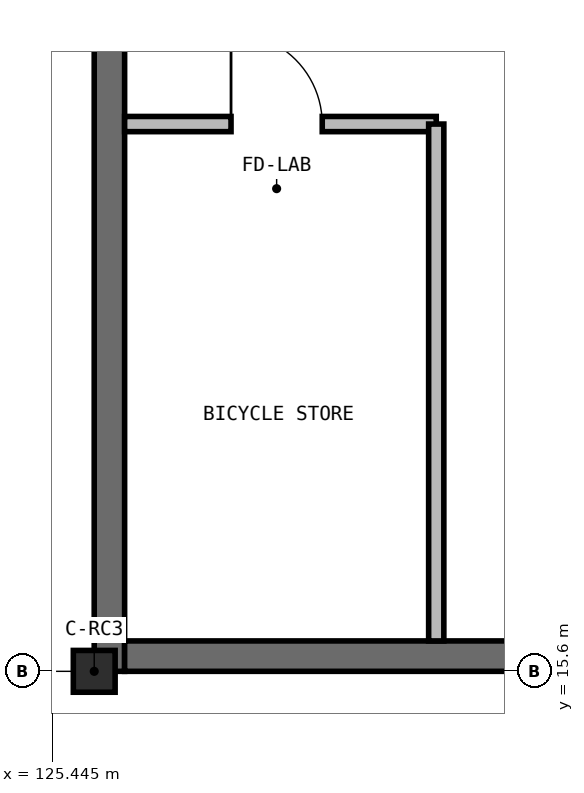
"""IFC4 building model, lengths in metres.
Left out: names, types, materials, properties, quantities, classifications, styles, units other than length and angle.
Written with IfcOpenShell. Run it as: python <this file> out.ifc"""

import sys

from ifc_helpers import new_model, si_unit, direction, frame, frame_2d, origin, origin_2d, place, context, subcontext, project, spatial, rectangle, extrude, element, fill, save


model = new_model("IFC4")
c1 = context("Model", 3, precision=1e-05, world=origin(), true_north=direction((0.0, 1.0)))
c2 = subcontext(c1, "Body", "Model", "MODEL_VIEW")
j1 = project(units=[si_unit("LENGTHUNIT", "METRE"), si_unit("PLANEANGLEUNIT", "RADIAN")], contexts=[c1])
p1 = place(None, origin())
s1 = spatial("IfcSite", under=j1, at=p1, CompositionType="ELEMENT")
p2 = place(p1, origin())
s2 = spatial("IfcBuilding", under=s1, at=p2, CompositionType="ELEMENT")
p3 = place(p2, frame((0.0, 0.0, -5.25)))
s3 = spatial("IfcBuildingStorey", under=s2, at=p3, CompositionType="ELEMENT", Elevation=-5.25)
p4 = place(p3, frame((126.2, 15.6, 0.0), z_axis=(0.0, 0.0, 1.0), x_axis=(0.0, 1.0, 0.0)))
e1 = element("IfcWall", 1, at=p4, inside=s3, PredefinedType="USERDEFINED", context=c2, shape_type="SweptSolid", body=[
    extrude(rectangle(XDim=55.2, YDim=0.4, at=frame_2d((27.6, 0.0))), origin(), (0.0, 0.0, 1.0), 5.25),
])
p5 = place(p3, frame((173.6, 15.8, 0.0), z_axis=(0.0, 0.0, 1.0), x_axis=(-1.0, 0.0, 0.0)))
e2 = element("IfcWall", 2, at=p5, inside=s3, PredefinedType="USERDEFINED", context=c2, shape_type="SweptSolid", body=[
    extrude(rectangle(XDim=47.2, YDim=0.4, at=frame_2d((23.6, 0.0))), origin(), (0.0, 0.0, 1.0), 5.25),
])
p6 = place(p3, frame((126.0, 15.6, 0.0), z_axis=(0.0, 0.0, 1.0), x_axis=(1.0, 0.0, 0.0)))
e3 = element("IfcColumn", 3, at=p6, inside=s3, PredefinedType="COLUMN", context=c2, shape_type="SweptSolid", body=[
    extrude(rectangle(XDim=0.55, YDim=0.55, at=origin_2d()), origin(), (0.0, 0.0, 1.0), 5.25),
])
p7 = place(p3, frame((126.4, 22.8, 0.0), z_axis=(0.0, 0.0, 1.0), x_axis=(1.0, 0.0, 0.0)))
e4 = element("IfcWall", 4, at=p7, inside=s3, PredefinedType="SOLIDWALL", context=c2, shape_type="SweptSolid", body=[
    extrude(rectangle(XDim=4.1, YDim=0.2, at=frame_2d((2.05, 0.0))), origin(), (0.0, 0.0, 1.0), 4.445),
])
p8 = place(p7, frame((1.4, 0.0, 0.0)))
e5 = element("IfcOpeningElement", 5, at=p8, cuts=e4, PredefinedType="OPENING", context=c2, shape_type="SweptSolid", body=[
    extrude(rectangle(XDim=1.2, YDim=2.2, at=frame_2d((0.6, 1.1))), frame((0.0, 0.11, 0.0), z_axis=(0.0, -1.0, 0.0), x_axis=(1.0, 0.0, 0.0)), (0.0, 0.0, 1.0), 0.22),
])
p9 = place(p3, frame((130.5, 16.0, 0.0), z_axis=(0.0, 0.0, 1.0), x_axis=(0.0, 1.0, 0.0)))
e6 = element("IfcWall", 6, at=p9, inside=s3, PredefinedType="SOLIDWALL", context=c2, shape_type="SweptSolid", body=[
    extrude(rectangle(XDim=6.8, YDim=0.2, at=frame_2d((3.4, 0.0))), origin(), (0.0, 0.0, 1.0), 5.0),
])
p10 = place(p8, origin())
e7 = element("IfcDoor", 7, at=p10, inside=s3, OperationType="SINGLE_SWING_LEFT", PredefinedType="DOOR", context=c2, shape_type="SweptSolid", body=[
    extrude(rectangle(XDim=1.2, YDim=2.2, at=frame_2d((0.6, 1.1))), frame((0.0, 0.025, 0.0), z_axis=(0.0, -1.0, 0.0), x_axis=(1.0, 0.0, 0.0)), (0.0, 0.0, 1.0), 0.05),
])
fill(e5, e7)
save(model, sys.argv[1])
